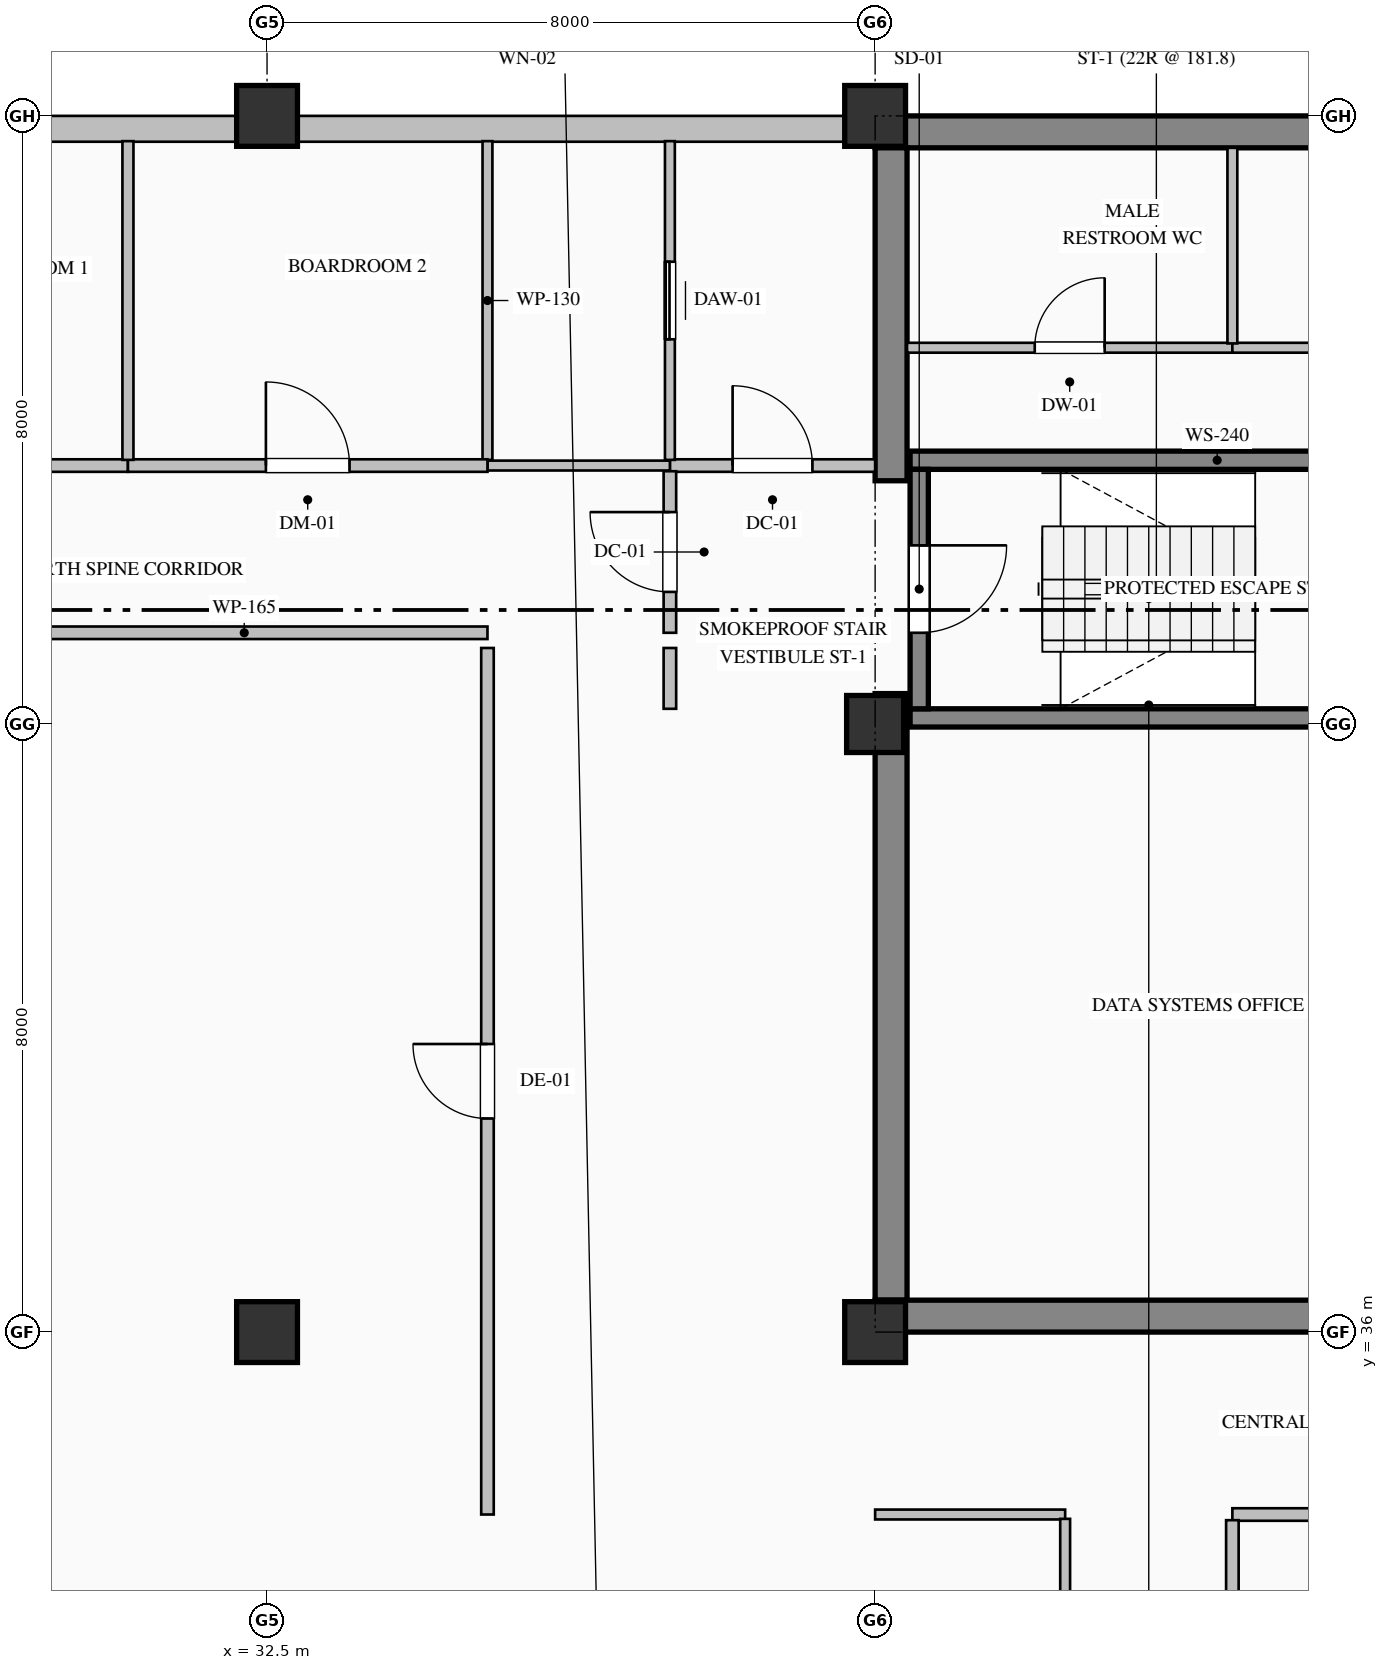
"""IFC4 building model, lengths in metres.
Left out: names, types, materials, properties, quantities, classifications, styles, units other than length and angle.
Written with IfcOpenShell. Run it as: python <this file> out.ifc"""

import sys

from ifc_helpers import new_model, si_unit, direction, frame, frame_2d, origin, origin_2d, place, context, subcontext, project, spatial, rectangle, hollow_rectangle, extrude, element, fill, save


model = new_model("IFC4")
c1 = context("Model", 3, precision=1e-05, world=origin(), true_north=direction((0.0, 1.0)))
c2 = subcontext(c1, "Body", "Model", "MODEL_VIEW")
j1 = project(units=[si_unit("LENGTHUNIT", "METRE"), si_unit("PLANEANGLEUNIT", "RADIAN")], contexts=[c1])
p1 = place(None, origin())
s1 = spatial("IfcSite", under=j1, at=p1, CompositionType="ELEMENT")
p2 = place(p1, origin())
s2 = spatial("IfcBuilding", under=s1, at=p2, CompositionType="ELEMENT")
p3 = place(p2, frame((0.0, 0.0, 363.2)))
s3 = spatial("IfcBuildingStorey", under=s2, at=p3, CompositionType="ELEMENT", Elevation=363.2)
p4 = place(p3, frame((40.5, 51.79, 0.0), z_axis=(0.0, 0.0, 1.0), x_axis=(1.0, 0.0, 0.0)))
e1 = element("IfcWall", 1, at=p4, inside=s3, PredefinedType="SHEAR", context=c2, shape_type="SweptSolid", body=[
    extrude(rectangle(XDim=23.5, YDim=0.42, at=frame_2d((11.75, 0.0))), origin(), (0.0, 0.0, 1.0), 3.58),
])
p5 = place(p3, frame((40.71, 36.42, 0.0), z_axis=(0.0, 0.0, 1.0), x_axis=(0.0, 1.0, 0.0)))
e2 = element("IfcWall", 2, at=p5, inside=s3, PredefinedType="SHEAR", context=c2, shape_type="SweptSolid", body=[
    extrude(rectangle(XDim=7.98, YDim=0.42, at=frame_2d((3.99, 0.0))), origin(), (0.0, 0.0, 1.0), 3.58),
])
p6 = place(p3, frame((40.71, 47.2, 0.0), z_axis=(0.0, 0.0, 1.0), x_axis=(0.0, 1.0, 0.0)))
e3 = element("IfcWall", 3, at=p6, inside=s3, PredefinedType="SHEAR", context=c2, shape_type="SweptSolid", body=[
    extrude(rectangle(XDim=4.38, YDim=0.42, at=frame_2d((2.19, 0.0))), origin(), (0.0, 0.0, 1.0), 3.58),
])
p7 = place(p3, frame((40.5, 36.21, 0.0), z_axis=(0.0, 0.0, 1.0), x_axis=(1.0, 0.0, 0.0)))
e4 = element("IfcWall", 4, at=p7, inside=s3, PredefinedType="SHEAR", context=c2, shape_type="SweptSolid", body=[
    extrude(rectangle(XDim=9.1, YDim=0.42, at=frame_2d((4.55, 0.0))), origin(), (0.0, 0.0, 1.0), 3.58),
])
for number, where, z_axis, x_axis in (
    (5, (32.5, 36.0, 0.0), (0.0, 0.0, 1.0), (1.0, 0.0, 0.0)),
    (6, (32.5, 52.0, 0.0), (0.0, 0.0, 1.0), (1.0, 0.0, 0.0)),
    (7, (40.5, 36.0, 0.0), (0.0, 0.0, 1.0), (1.0, 0.0, 0.0)),
):
    element("IfcColumn", number, at=place(p3, frame(where, z_axis=z_axis, x_axis=x_axis)), inside=s3, PredefinedType="COLUMN", context=c2, shape_type="SweptSolid", body=[
        extrude(hollow_rectangle(XDim=0.8, YDim=0.8, WallThickness=0.032, at=origin_2d()), origin(), (0.0, 0.0, 1.0), 4.0),
    ])
p8 = place(p3, frame((40.5, 44.0, 0.0), z_axis=(0.0, 0.0, 1.0), x_axis=(1.0, 0.0, 0.0)))
e8 = element("IfcColumn", 8, at=p8, inside=s3, PredefinedType="COLUMN", context=c2, shape_type="SweptSolid", body=[
    extrude(rectangle(XDim=0.75, YDim=0.75, at=origin_2d()), origin(), (0.0, 0.0, 1.0), 4.0),
])
p9 = place(p3, frame((40.5, 52.0, 0.0), z_axis=(0.0, 0.0, 1.0), x_axis=(1.0, 0.0, 0.0)))
e9 = element("IfcColumn", 9, at=p9, inside=s3, PredefinedType="COLUMN", context=c2, shape_type="SweptSolid", body=[
    extrude(hollow_rectangle(XDim=0.8, YDim=0.8, WallThickness=0.032, at=origin_2d()), origin(), (0.0, 0.0, 1.0), 4.0),
])
p10 = place(p3, frame((20.5, 51.83, 0.0), z_axis=(0.0, 0.0, 1.0), x_axis=(1.0, 0.0, 0.0)))
e10 = element("IfcWall", 10, at=p10, inside=s3, PredefinedType="SOLIDWALL", context=c2, shape_type="SweptSolid", body=[
    extrude(rectangle(XDim=20.02, YDim=0.34, at=frame_2d((10.01, 0.0))), origin(), (0.0, 0.0, 1.0), 3.13),
])
p11 = place(p10, frame((6.6, 0.0, 0.7)))
e11 = element("IfcOpeningElement", 11, at=p11, cuts=e10, PredefinedType="OPENING", context=c2, shape_type="SweptSolid", body=[
    extrude(rectangle(XDim=1.2, YDim=1.85, at=frame_2d((0.6, 0.925))), frame((0.0, 0.18, 0.0), z_axis=(0.0, -1.0, 0.0), x_axis=(1.0, 0.0, 0.0)), (0.0, 0.0, 1.0), 0.36),
])
for number, where, z_axis, x_axis in (
    (12, (40.96, 47.47, 0.0), (0.0, 0.0, 1.0), (1.0, 0.0, 0.0)),
    (13, (49.04, 44.08, 0.0), (0.0, 0.0, 1.0), (-1.0, 0.0, 0.0)),
):
    element("IfcWall", number, at=place(p3, frame(where, z_axis=z_axis, x_axis=x_axis)), inside=s3, PredefinedType="SOLIDWALL", context=c2, shape_type="SweptSolid", body=[
        extrude(rectangle(XDim=8.08, YDim=0.24, at=frame_2d((4.04, 0.0))), origin(), (0.0, 0.0, 1.0), 4.0),
    ])
p12 = place(p3, frame((41.08, 47.35, 0.0), z_axis=(0.0, 0.0, 1.0), x_axis=(0.0, -1.0, 0.0)))
e14 = element("IfcWall", 14, at=p12, inside=s3, PredefinedType="SOLIDWALL", context=c2, shape_type="SweptSolid", body=[
    extrude(rectangle(XDim=3.15, YDim=0.24, at=frame_2d((1.575, 0.0))), origin(), (0.0, 0.0, 1.0), 4.0),
])
p13 = place(p12, frame((1.0, 0.0, 0.0)))
e15 = element("IfcOpeningElement", 15, at=p13, cuts=e14, PredefinedType="OPENING", context=c2, shape_type="SweptSolid", body=[
    extrude(rectangle(XDim=1.15, YDim=2.2, at=frame_2d((0.575, 1.1))), frame((0.0, 0.13, 0.0), z_axis=(0.0, -1.0, 0.0), x_axis=(1.0, 0.0, 0.0)), (0.0, 0.0, 1.0), 0.26),
])
p14 = place(p3, frame((37.8, 47.4, 0.0), z_axis=(0.0, 0.0, 1.0), x_axis=(1.0, 0.0, 0.0)))
e16 = element("IfcWall", 16, at=p14, inside=s3, PredefinedType="PARTITIONING", context=c2, shape_type="SweptSolid", body=[
    extrude(rectangle(XDim=2.7, YDim=0.165, at=frame_2d((1.35, 0.0))), origin(), (0.0, 0.0, 1.0), 3.58),
])
p15 = place(p14, frame((0.825, 0.0, 0.0)))
e17 = element("IfcOpeningElement", 17, at=p15, cuts=e16, PredefinedType="OPENING", context=c2, shape_type="SweptSolid", body=[
    extrude(rectangle(XDim=1.05, YDim=2.15, at=frame_2d((0.525, 1.075))), frame((0.0, 0.093, 0.0), z_axis=(0.0, -1.0, 0.0), x_axis=(1.0, 0.0, 0.0)), (0.0, 0.0, 1.0), 0.185),
])
p16 = place(p3, frame((37.8, 45.2, 0.0), z_axis=(0.0, 0.0, 1.0), x_axis=(0.0, 1.0, 0.0)))
e18 = element("IfcWall", 18, at=p16, inside=s3, PredefinedType="PARTITIONING", context=c2, shape_type="SweptSolid", body=[
    extrude(rectangle(XDim=2.125, YDim=0.165, at=frame_2d((1.063, 0.0))), origin(), (0.0, 0.0, 1.0), 3.58),
])
p17 = place(p16, frame((0.538, 0.0, 0.0)))
e19 = element("IfcOpeningElement", 19, at=p17, cuts=e18, PredefinedType="OPENING", context=c2, shape_type="SweptSolid", body=[
    extrude(rectangle(XDim=1.05, YDim=2.15, at=frame_2d((0.525, 1.075))), frame((0.0, 0.093, 0.0), z_axis=(0.0, -1.0, 0.0), x_axis=(1.0, 0.0, 0.0)), (0.0, 0.0, 1.0), 0.185),
])
p18 = place(p3, frame((37.8, 44.2, 0.0), z_axis=(0.0, 0.0, 1.0), x_axis=(0.0, 1.0, 0.0)))
e20 = element("IfcWall", 20, at=p18, inside=s3, PredefinedType="PARTITIONING", context=c2, shape_type="SweptSolid", body=[
    extrude(rectangle(XDim=0.8, YDim=0.165, at=frame_2d((0.4, 0.0))), origin(), (0.0, 0.0, 1.0), 3.58),
])
p19 = place(p3, frame((37.8, 47.475, 0.0), z_axis=(0.0, 0.0, 1.0), x_axis=(0.0, 1.0, 0.0)))
e21 = element("IfcWall", 21, at=p19, inside=s3, PredefinedType="PARTITIONING", context=c2, shape_type="SweptSolid", body=[
    extrude(rectangle(XDim=4.193, YDim=0.13, at=frame_2d((2.097, 0.0))), origin(), (0.0, 0.0, 1.0), 3.58),
])
p20 = place(p19, frame((1.587, 0.0, 0.0)))
e22 = element("IfcOpeningElement", 22, at=p20, cuts=e21, PredefinedType="OPENING", context=c2, shape_type="SweptSolid", body=[
    extrude(rectangle(XDim=1.02, YDim=2.15, at=frame_2d((0.51, 1.075))), frame((0.0, 0.075, 0.0), z_axis=(0.0, -1.0, 0.0), x_axis=(1.0, 0.0, 0.0)), (0.0, 0.0, 1.0), 0.15),
])
p21 = place(p3, frame((37.8, 47.4, 0.0), z_axis=(0.0, 0.0, 1.0), x_axis=(-1.0, 0.0, 0.0)))
e23 = element("IfcWall", 23, at=p21, inside=s3, PredefinedType="PARTITIONING", context=c2, shape_type="SweptSolid", body=[
    extrude(rectangle(XDim=2.4, YDim=0.13, at=frame_2d((1.2, 0.0))), origin(), (0.0, 0.0, 1.0), 3.58),
])
p22 = place(p3, frame((35.4, 47.475, 0.0), z_axis=(0.0, 0.0, 1.0), x_axis=(0.0, 1.0, 0.0)))
e24 = element("IfcWall", 24, at=p22, inside=s3, PredefinedType="PARTITIONING", context=c2, shape_type="SweptSolid", body=[
    extrude(rectangle(XDim=4.193, YDim=0.13, at=frame_2d((2.097, 0.0))), origin(), (0.0, 0.0, 1.0), 3.58),
])
p23 = place(p3, frame((40.92, 48.95, 0.0), z_axis=(0.0, 0.0, 1.0), x_axis=(1.0, 0.0, 0.0)))
e25 = element("IfcWall", 25, at=p23, inside=s3, PredefinedType="PARTITIONING", context=c2, shape_type="SweptSolid", body=[
    extrude(rectangle(XDim=4.28, YDim=0.13, at=frame_2d((2.14, 0.0))), origin(), (0.0, 0.0, 1.0), 3.58),
])
p24 = place(p23, frame((1.68, 0.0, 0.0)))
e26 = element("IfcOpeningElement", 26, at=p24, cuts=e25, PredefinedType="OPENING", context=c2, shape_type="SweptSolid", body=[
    extrude(rectangle(XDim=0.92, YDim=2.15, at=frame_2d((0.46, 1.075))), frame((0.0, 0.075, 0.0), z_axis=(0.0, -1.0, 0.0), x_axis=(1.0, 0.0, 0.0)), (0.0, 0.0, 1.0), 0.15),
])
p25 = place(p3, frame((45.2, 48.95, 0.0), z_axis=(0.0, 0.0, 1.0), x_axis=(1.0, 0.0, 0.0)))
e27 = element("IfcWall", 27, at=p25, inside=s3, PredefinedType="PARTITIONING", context=c2, shape_type="SweptSolid", body=[
    extrude(rectangle(XDim=4.033, YDim=0.13, at=frame_2d((2.017, 0.0))), origin(), (0.0, 0.0, 1.0), 3.58),
])
p26 = place(p25, frame((1.556, 0.0, 0.0)))
e28 = element("IfcOpeningElement", 28, at=p26, cuts=e27, PredefinedType="OPENING", context=c2, shape_type="SweptSolid", body=[
    extrude(rectangle(XDim=0.92, YDim=2.15, at=frame_2d((0.46, 1.075))), frame((0.0, 0.075, 0.0), z_axis=(0.0, -1.0, 0.0), x_axis=(1.0, 0.0, 0.0)), (0.0, 0.0, 1.0), 0.15),
])
p27 = place(p3, frame((45.2, 51.58, 0.0), z_axis=(0.0, 0.0, 1.0), x_axis=(0.0, -1.0, 0.0)))
e29 = element("IfcWall", 29, at=p27, inside=s3, PredefinedType="PARTITIONING", context=c2, shape_type="SweptSolid", body=[
    extrude(rectangle(XDim=2.573, YDim=0.13, at=frame_2d((1.287, 0.0))), origin(), (0.0, 0.0, 1.0), 3.58),
])
p28 = place(p3, frame((25.95, 47.4, 0.0), z_axis=(0.0, 0.0, 1.0), x_axis=(1.0, 0.0, 0.0)))
e30 = element("IfcWall", 30, at=p28, inside=s3, PredefinedType="PARTITIONING", context=c2, shape_type="SweptSolid", body=[
    extrude(rectangle(XDim=4.72, YDim=0.165, at=frame_2d((2.36, 0.0))), origin(), (0.0, 0.0, 1.0), 3.58),
])
p29 = place(p28, frame((1.91, 0.0, 0.0)))
e31 = element("IfcOpeningElement", 31, at=p29, cuts=e30, PredefinedType="OPENING", context=c2, shape_type="SweptSolid", body=[
    extrude(rectangle(XDim=0.9, YDim=2.15, at=frame_2d((0.45, 1.075))), frame((0.0, 0.093, 0.0), z_axis=(0.0, -1.0, 0.0), x_axis=(1.0, 0.0, 0.0)), (0.0, 0.0, 1.0), 0.185),
])
p30 = place(p3, frame((30.67, 47.4, 0.0), z_axis=(0.0, 0.0, 1.0), x_axis=(1.0, 0.0, 0.0)))
e32 = element("IfcWall", 32, at=p30, inside=s3, PredefinedType="PARTITIONING", context=c2, shape_type="SweptSolid", body=[
    extrude(rectangle(XDim=4.73, YDim=0.165, at=frame_2d((2.365, 0.0))), origin(), (0.0, 0.0, 1.0), 3.58),
])
p31 = place(p30, frame((1.815, 0.0, 0.0)))
e33 = element("IfcOpeningElement", 33, at=p31, cuts=e32, PredefinedType="OPENING", context=c2, shape_type="SweptSolid", body=[
    extrude(rectangle(XDim=1.1, YDim=2.2, at=frame_2d((0.55, 1.1))), frame((0.0, 0.093, 0.0), z_axis=(0.0, -1.0, 0.0), x_axis=(1.0, 0.0, 0.0)), (0.0, 0.0, 1.0), 0.185),
])
p32 = place(p3, frame((35.4, 45.2, 0.0), z_axis=(0.0, 0.0, 1.0), x_axis=(-1.0, 0.0, 0.0)))
e34 = element("IfcWall", 34, at=p32, inside=s3, PredefinedType="PARTITIONING", context=c2, shape_type="SweptSolid", body=[
    extrude(rectangle(XDim=6.4, YDim=0.165, at=frame_2d((3.2, 0.0))), origin(), (0.0, 0.0, 1.0), 3.58),
])
p33 = place(p3, frame((35.4, 33.6, 0.0), z_axis=(0.0, 0.0, 1.0), x_axis=(0.0, 1.0, 0.0)))
e35 = element("IfcWall", 35, at=p33, inside=s3, PredefinedType="PARTITIONING", context=c2, shape_type="SweptSolid", body=[
    extrude(rectangle(XDim=11.4, YDim=0.165, at=frame_2d((5.7, 0.0))), origin(), (0.0, 0.0, 1.0), 3.58),
])
p34 = place(p33, frame((5.21, 0.0, 0.0)))
e36 = element("IfcOpeningElement", 36, at=p34, cuts=e35, PredefinedType="OPENING", context=c2, shape_type="SweptSolid", body=[
    extrude(rectangle(XDim=0.98, YDim=2.25, at=frame_2d((0.49, 1.125))), frame((0.0, 0.093, 0.0), z_axis=(0.0, -1.0, 0.0), x_axis=(1.0, 0.0, 0.0)), (0.0, 0.0, 1.0), 0.185),
])
p35 = place(p3, frame((56.5, 33.6, 0.0), z_axis=(0.0, 0.0, 1.0), x_axis=(-1.0, 0.0, 0.0)))
e37 = element("IfcWall", 37, at=p35, inside=s3, PredefinedType="PARTITIONING", context=c2, shape_type="SweptSolid", body=[
    extrude(rectangle(XDim=11.3, YDim=0.165, at=frame_2d((5.65, 0.0))), origin(), (0.0, 0.0, 1.0), 3.58),
])
p36 = place(p35, frame((5.2, 0.0, 0.0)))
e38 = element("IfcOpeningElement", 38, at=p36, cuts=e37, PredefinedType="OPENING", context=c2, shape_type="SweptSolid", body=[
    extrude(rectangle(XDim=0.9, YDim=2.15, at=frame_2d((0.45, 1.075))), frame((0.0, 0.093, 0.0), z_axis=(0.0, -1.0, 0.0), x_axis=(1.0, 0.0, 0.0)), (0.0, 0.0, 1.0), 0.185),
])
p37 = place(p3, frame((43.0, 33.6, 0.0), z_axis=(0.0, 0.0, 1.0), x_axis=(-1.0, 0.0, 0.0)))
e39 = element("IfcWall", 39, at=p37, inside=s3, PredefinedType="PARTITIONING", context=c2, shape_type="SweptSolid", body=[
    extrude(rectangle(XDim=2.5, YDim=0.13, at=frame_2d((1.25, 0.0))), origin(), (0.0, 0.0, 1.0), 3.58),
])
p38 = place(p3, frame((45.2, 33.525, 0.0), z_axis=(0.0, 0.0, 1.0), x_axis=(0.0, -1.0, 0.0)))
e40 = element("IfcWall", 40, at=p38, inside=s3, PredefinedType="PARTITIONING", context=c2, shape_type="SweptSolid", body=[
    extrude(rectangle(XDim=1.091, YDim=0.165, at=frame_2d((0.545, 0.0))), origin(), (0.0, 0.0, 1.0), 3.58),
])
p39 = place(p3, frame((43.0, 22.875, 0.0), z_axis=(0.0, 0.0, 1.0), x_axis=(0.0, 1.0, 0.0)))
e41 = element("IfcWall", 41, at=p39, inside=s3, PredefinedType="PARTITIONING", context=c2, shape_type="SweptSolid", body=[
    extrude(rectangle(XDim=10.668, YDim=0.13, at=frame_2d((5.334, 0.0))), origin(), (0.0, 0.0, 1.0), 3.58),
])
p40 = place(p39, frame((4.834, 0.0, 0.0)))
e42 = element("IfcOpeningElement", 42, at=p40, cuts=e41, PredefinedType="OPENING", context=c2, shape_type="SweptSolid", body=[
    extrude(rectangle(XDim=1.0, YDim=2.15, at=frame_2d((0.5, 1.075))), frame((0.0, 0.075, 0.0), z_axis=(0.0, -1.0, 0.0), x_axis=(1.0, 0.0, 0.0)), (0.0, 0.0, 1.0), 0.15),
])
p41 = place(p3, frame((30.67, 51.668, 0.0), z_axis=(0.0, 0.0, 1.0), x_axis=(0.0, -1.0, 0.0)))
e43 = element("IfcWall", 43, at=p41, inside=s3, PredefinedType="PARTITIONING", context=c2, shape_type="SweptSolid", body=[
    extrude(rectangle(XDim=4.193, YDim=0.145, at=frame_2d((2.097, 0.0))), origin(), (0.0, 0.0, 1.0), 3.58),
])
p42 = place(p13, origin())
e44 = element("IfcDoor", 44, at=p42, inside=s3, OperationType="SINGLE_SWING_LEFT", PredefinedType="DOOR", context=c2, shape_type="SweptSolid", body=[
    extrude(rectangle(XDim=1.15, YDim=2.2, at=frame_2d((0.575, 1.1))), frame((0.0, 0.025, 0.0), z_axis=(0.0, -1.0, 0.0), x_axis=(1.0, 0.0, 0.0)), (0.0, 0.0, 1.0), 0.05),
])
fill(e15, e44)
p43 = place(p15, origin())
e45 = element("IfcDoor", 45, at=p43, inside=s3, OperationType="SINGLE_SWING_LEFT", PredefinedType="DOOR", context=c2, shape_type="SweptSolid", body=[
    extrude(rectangle(XDim=1.05, YDim=2.15, at=frame_2d((0.525, 1.075))), frame((0.0, 0.025, 0.0), z_axis=(0.0, -1.0, 0.0), x_axis=(1.0, 0.0, 0.0)), (0.0, 0.0, 1.0), 0.05),
])
fill(e17, e45)
p44 = place(p17, origin())
e46 = element("IfcDoor", 46, at=p44, inside=s3, OperationType="SINGLE_SWING_RIGHT", PredefinedType="DOOR", context=c2, shape_type="SweptSolid", body=[
    extrude(rectangle(XDim=1.05, YDim=2.15, at=frame_2d((0.525, 1.075))), frame((0.0, 0.025, 0.0), z_axis=(0.0, -1.0, 0.0), x_axis=(1.0, 0.0, 0.0)), (0.0, 0.0, 1.0), 0.05),
])
fill(e19, e46)
p45 = place(p20, origin())
e47 = element("IfcDoor", 47, at=p45, inside=s3, OperationType="SLIDING_TO_LEFT", PredefinedType="DOOR", context=c2, shape_type="SweptSolid", body=[
    extrude(rectangle(XDim=1.02, YDim=2.15, at=frame_2d((0.51, 1.075))), frame((0.0, 0.025, 0.0), z_axis=(0.0, -1.0, 0.0), x_axis=(1.0, 0.0, 0.0)), (0.0, 0.0, 1.0), 0.05),
])
fill(e22, e47)
p46 = place(p24, origin())
e48 = element("IfcDoor", 48, at=p46, inside=s3, OperationType="SINGLE_SWING_RIGHT", PredefinedType="DOOR", context=c2, shape_type="SweptSolid", body=[
    extrude(rectangle(XDim=0.92, YDim=2.15, at=frame_2d((0.46, 1.075))), frame((0.0, 0.025, 0.0), z_axis=(0.0, -1.0, 0.0), x_axis=(1.0, 0.0, 0.0)), (0.0, 0.0, 1.0), 0.05),
])
fill(e26, e48)
p47 = place(p31, origin())
e49 = element("IfcDoor", 49, at=p47, inside=s3, OperationType="SINGLE_SWING_LEFT", PredefinedType="DOOR", context=c2, shape_type="SweptSolid", body=[
    extrude(rectangle(XDim=1.1, YDim=2.2, at=frame_2d((0.55, 1.1))), frame((0.0, 0.025, 0.0), z_axis=(0.0, -1.0, 0.0), x_axis=(1.0, 0.0, 0.0)), (0.0, 0.0, 1.0), 0.05),
])
fill(e33, e49)
p48 = place(p34, origin())
e50 = element("IfcDoor", 50, at=p48, inside=s3, OperationType="SINGLE_SWING_RIGHT", PredefinedType="DOOR", context=c2, shape_type="SweptSolid", body=[
    extrude(rectangle(XDim=0.98, YDim=2.25, at=frame_2d((0.49, 1.125))), frame((0.0, 0.025, 0.0), z_axis=(0.0, -1.0, 0.0), x_axis=(1.0, 0.0, 0.0)), (0.0, 0.0, 1.0), 0.05),
])
fill(e36, e50)
save(model, sys.argv[1])
